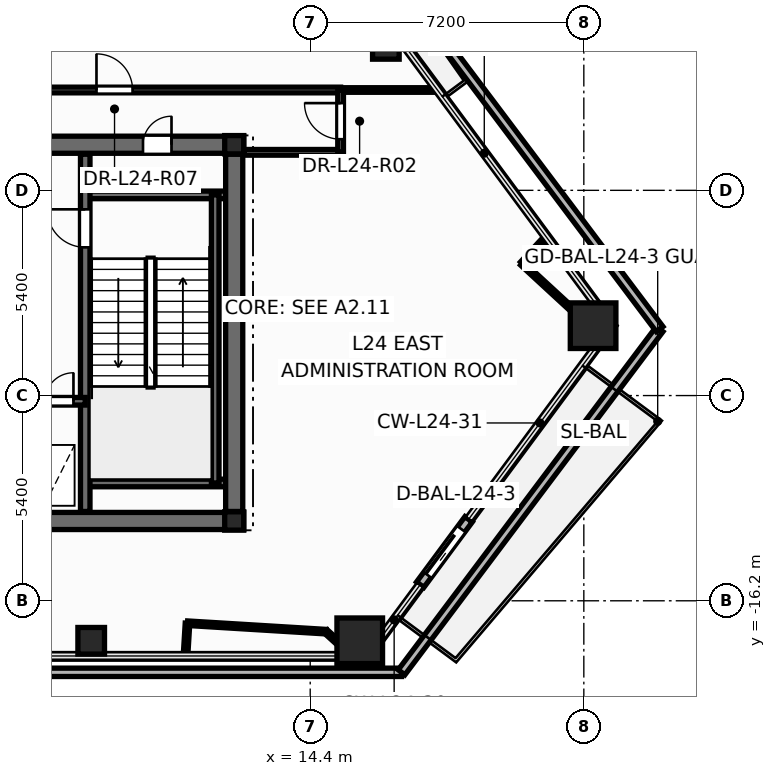
"""IFC4 building model, lengths in metres.
Left out: names, types, materials, properties, quantities, classifications, styles, units other than length and angle.
Written with IfcOpenShell. Run it as: python <this file> out.ifc"""

import sys

from ifc_helpers import new_model, si_unit, direction, frame, frame_2d, origin, origin_2d, place, context, subcontext, project, spatial, rectangle, hollow_rectangle, hollow_circle, i_section, extrude, element, fill, save


model = new_model("IFC4")
c1 = context("Model", 3, precision=1e-05, world=origin(), true_north=direction((0.0, 1.0)))
c2 = subcontext(c1, "Body", "Model", "MODEL_VIEW")
j1 = project(units=[si_unit("LENGTHUNIT", "METRE"), si_unit("PLANEANGLEUNIT", "RADIAN")], contexts=[c1])
p1 = place(None, origin())
s1 = spatial("IfcSite", under=j1, at=p1, CompositionType="ELEMENT")
p2 = place(p1, origin())
s2 = spatial("IfcBuilding", under=s1, at=p2, CompositionType="ELEMENT")
p3 = place(p2, frame((0.0, 0.0, 94.8)))
s3 = spatial("IfcBuildingStorey", under=s2, at=p3, CompositionType="ELEMENT", Elevation=94.8)
for number, where, z_axis, x_axis in (
    (1, (15.704, -17.252, 0.0), (0.0, 0.0, 1.0), (1.0, 0.0, 0.0)),
    (2, (21.844, -8.961, 0.0), (0.0, 0.0, 1.0), (1.0, 0.0, 0.0)),
):
    element("IfcColumn", number, at=place(p3, frame(where, z_axis=z_axis, x_axis=x_axis)), inside=s3, PredefinedType="COLUMN", context=c2, shape_type="SweptSolid", body=[
        extrude(hollow_rectangle(XDim=1.2, YDim=1.2, WallThickness=0.055, at=origin_2d()), origin(), (0.0, 0.0, 1.0), 4.8),
    ])
for number, where, z_axis, x_axis in (
    (3, (8.637, -17.252, 0.0), (0.0, 0.0, 1.0), (1.0, 0.0, 0.0)),
    (4, (16.391, -1.599, 0.0), (0.0, 0.0, 1.0), (1.0, 0.0, 0.0)),
):
    element("IfcColumn", number, at=place(p3, frame(where, z_axis=z_axis, x_axis=x_axis)), inside=s3, PredefinedType="COLUMN", context=c2, shape_type="SweptSolid", body=[
        extrude(hollow_circle(Radius=0.35, WallThickness=0.03, at=origin_2d()), origin(), (0.0, 0.0, 1.0), 4.8),
    ])
for number, where, z_axis, x_axis in (
    (5, (12.4, -14.1, 0.0), (0.0, 0.0, 1.0), (1.0, 0.0, 0.0)),
    (6, (12.4, -4.2, 0.0), (0.0, 0.0, 1.0), (1.0, 0.0, 0.0)),
):
    element("IfcColumn", number, at=place(p3, frame(where, z_axis=z_axis, x_axis=x_axis)), inside=s3, PredefinedType="COLUMN", context=c2, shape_type="SweptSolid", body=[
        extrude(i_section(OverallWidth=0.5, OverallDepth=0.482, WebThickness=0.04, FlangeThickness=0.045, at=origin_2d()), origin(), (0.0, 0.0, 1.0), 4.8),
    ])
p4 = place(p3, frame((-16.803, -18.082, -0.02), z_axis=(0.0, 0.0, 1.0), x_axis=(1.0, 0.0, 0.0)))
e7 = element("IfcWall", 7, at=p4, inside=s3, PredefinedType="PARAPET", context=c2, shape_type="SweptSolid", body=[
    extrude(rectangle(XDim=33.607, YDim=0.22, at=frame_2d((16.803, 0.0))), origin(), (0.0, 0.0, 1.0), 1.17),
])
p5 = place(p3, frame((16.803, -18.082, -0.02), z_axis=(0.0, 0.0, 1.0), x_axis=(0.601053883543, 0.79920850163, 0.0)))
e8 = element("IfcWall", 8, at=p5, inside=s3, PredefinedType="PARAPET", context=c2, shape_type="SweptSolid", body=[
    extrude(rectangle(XDim=11.299, YDim=0.22, at=frame_2d((5.65, 0.0))), origin(), (0.0, 0.0, 1.0), 1.17),
])
p6 = place(p3, frame((23.595, -9.052, -0.02), z_axis=(0.0, 0.0, 1.0), x_axis=(-0.601046808783, 0.799213822235, 0.0)))
e9 = element("IfcWall", 9, at=p6, inside=s3, PredefinedType="PARAPET", context=c2, shape_type="SweptSolid", body=[
    extrude(rectangle(XDim=27.898, YDim=0.22, at=frame_2d((13.949, 0.0))), origin(), (0.0, 0.0, 1.0), 1.17),
])
p7 = place(p3, frame((17.294, -15.776, -0.015), z_axis=(0.0, 0.0, 1.0), x_axis=(0.595170255066, 0.803599631337, 0.0)))
e10 = element("IfcWall", 10, at=p7, inside=s3, PredefinedType="STANDARD", context=c2, shape_type="SweptSolid", body=[
    extrude(rectangle(XDim=2.14, YDim=0.24, at=frame_2d((1.07, 0.0))), origin(), (0.0, 0.0, 1.0), 3.928),
])
p8 = place(p7, frame((0.32, 0.0, 0.015)))
e11 = element("IfcOpeningElement", 11, at=p8, cuts=e10, PredefinedType="OPENING", context=c2, shape_type="SweptSolid", body=[
    extrude(rectangle(XDim=1.506, YDim=2.204, at=frame_2d((0.75, 1.102))), frame((0.0, 0.13, 0.0), z_axis=(0.0, -1.0, 0.0), x_axis=(1.0, 0.0, 0.0)), (0.0, 0.0, 1.0), 0.26),
])
p9 = place(p3, frame((-12.65, -14.1, 0.0), z_axis=(0.0, 0.0, 1.0), x_axis=(1.0, 0.0, 0.0)))
e12 = element("IfcWall", 12, at=p9, inside=s3, PredefinedType="SHEAR", context=c2, shape_type="SweptSolid", body=[
    extrude(rectangle(XDim=25.3, YDim=0.45, at=frame_2d((12.65, 0.0))), origin(), (0.0, 0.0, 1.0), 4.8),
])
p10 = place(p3, frame((-12.65, -4.2, 0.0), z_axis=(0.0, 0.0, 1.0), x_axis=(1.0, 0.0, 0.0)))
e13 = element("IfcWall", 13, at=p10, inside=s3, PredefinedType="SHEAR", context=c2, shape_type="SweptSolid", body=[
    extrude(rectangle(XDim=25.3, YDim=0.45, at=frame_2d((12.65, 0.0))), origin(), (0.0, 0.0, 1.0), 4.8),
])
p11 = place(p10, frame((1.85, 0.0, 0.0)))
e14 = element("IfcOpeningElement", 14, at=p11, cuts=e13, PredefinedType="OPENING", context=c2, shape_type="SweptSolid", body=[
    extrude(rectangle(XDim=0.756, YDim=2.054, at=frame_2d((0.375, 1.027))), frame((0.0, 0.235, 0.0), z_axis=(0.0, -1.0, 0.0), x_axis=(1.0, 0.0, 0.0)), (0.0, 0.0, 1.0), 0.47),
])
p12 = place(p10, frame((22.65, 0.0, 0.0)))
e15 = element("IfcOpeningElement", 15, at=p12, cuts=e13, PredefinedType="OPENING", context=c2, shape_type="SweptSolid", body=[
    extrude(rectangle(XDim=0.756, YDim=2.054, at=frame_2d((0.375, 1.027))), frame((0.0, 0.235, 0.0), z_axis=(0.0, -1.0, 0.0), x_axis=(1.0, 0.0, 0.0)), (0.0, 0.0, 1.0), 0.47),
])
p13 = place(p10, frame((5.85, 0.0, 0.0)))
e16 = element("IfcOpeningElement", 16, at=p13, cuts=e13, PredefinedType="OPENING", context=c2, shape_type="SweptSolid", body=[
    extrude(rectangle(XDim=1.006, YDim=2.104, at=frame_2d((0.5, 1.052))), frame((0.0, 0.235, 0.0), z_axis=(0.0, -1.0, 0.0), x_axis=(1.0, 0.0, 0.0)), (0.0, 0.0, 1.0), 0.47),
])
p14 = place(p10, frame((10.35, 0.0, 0.0)))
e17 = element("IfcOpeningElement", 17, at=p14, cuts=e13, PredefinedType="OPENING", context=c2, shape_type="SweptSolid", body=[
    extrude(rectangle(XDim=1.406, YDim=2.154, at=frame_2d((0.7, 1.077))), frame((0.0, 0.235, 0.0), z_axis=(0.0, -1.0, 0.0), x_axis=(1.0, 0.0, 0.0)), (0.0, 0.0, 1.0), 0.47),
])
p15 = place(p10, frame((18.45, 0.0, 0.0)))
e18 = element("IfcOpeningElement", 18, at=p15, cuts=e13, PredefinedType="OPENING", context=c2, shape_type="SweptSolid", body=[
    extrude(rectangle(XDim=1.006, YDim=2.104, at=frame_2d((0.5, 1.052))), frame((0.0, 0.235, 0.0), z_axis=(0.0, -1.0, 0.0), x_axis=(1.0, 0.0, 0.0)), (0.0, 0.0, 1.0), 0.47),
])
for number, where, z_axis, x_axis in (
    (19, (8.48, -5.52, 0.0), (0.0, 0.0, 1.0), (1.0, 0.0, 0.0)),
    (20, (8.48, -13.1, 0.0), (0.0, 0.0, 1.0), (1.0, 0.0, 0.0)),
):
    element("IfcWall", number, at=place(p3, frame(where, z_axis=z_axis, x_axis=x_axis)), inside=s3, PredefinedType="SOLIDWALL", context=c2, shape_type="SweptSolid", body=[
        extrude(rectangle(XDim=3.87, YDim=0.2, at=frame_2d((1.935, 0.0))), origin(), (0.0, 0.0, 1.0), 4.8),
    ])
p16 = place(p3, frame((11.9, -13.1, 0.0), z_axis=(0.0, 0.0, 1.0), x_axis=(0.0, 1.0, 0.0)))
e21 = element("IfcWall", 21, at=p16, inside=s3, PredefinedType="SOLIDWALL", context=c2, shape_type="SweptSolid", body=[
    extrude(rectangle(XDim=7.58, YDim=0.2, at=frame_2d((3.79, 0.0))), origin(), (0.0, 0.0, 1.0), 4.8),
])
p17 = place(p3, frame((8.48, -13.85, 0.0), z_axis=(0.0, 0.0, 1.0), x_axis=(0.0, 1.0, 0.0)))
e22 = element("IfcWall", 22, at=p17, inside=s3, PredefinedType="SHEAR", context=c2, shape_type="SweptSolid", body=[
    extrude(rectangle(XDim=9.4, YDim=0.25, at=frame_2d((4.7, 0.0))), origin(), (0.0, 0.0, 1.0), 4.8),
])
p18 = place(p17, frame((6.95, 0.0, 0.0)))
e23 = element("IfcOpeningElement", 23, at=p18, cuts=e22, PredefinedType="OPENING", context=c2, shape_type="SweptSolid", body=[
    extrude(rectangle(XDim=1.006, YDim=2.104, at=frame_2d((0.5, 1.052))), frame((0.0, 0.135, 0.0), z_axis=(0.0, -1.0, 0.0), x_axis=(1.0, 0.0, 0.0)), (0.0, 0.0, 1.0), 0.27),
])
p19 = place(p3, frame((5.12, -10.95, 0.0), z_axis=(0.0, 0.0, 1.0), x_axis=(1.0, 0.0, 0.0)))
e24 = element("IfcWall", 24, at=p19, inside=s3, PredefinedType="SOLIDWALL", context=c2, shape_type="SweptSolid", body=[
    extrude(rectangle(XDim=3.36, YDim=0.2, at=frame_2d((1.68, 0.0))), origin(), (0.0, 0.0, 1.0), 4.8),
])
p20 = place(p19, frame((0.42, 0.0, 0.0)))
e25 = element("IfcOpeningElement", 25, at=p20, cuts=e24, PredefinedType="OPENING", context=c2, shape_type="SweptSolid", body=[
    extrude(rectangle(XDim=1.106, YDim=2.104, at=frame_2d((0.55, 1.052))), frame((0.0, 0.11, 0.0), z_axis=(0.0, -1.0, 0.0), x_axis=(1.0, 0.0, 0.0)), (0.0, 0.0, 1.0), 0.22),
])
p21 = place(p19, frame((2.3, 0.0, 0.0)))
e26 = element("IfcOpeningElement", 26, at=p21, cuts=e24, PredefinedType="OPENING", context=c2, shape_type="SweptSolid", body=[
    extrude(rectangle(XDim=0.756, YDim=2.054, at=frame_2d((0.375, 1.027))), frame((0.0, 0.11, 0.0), z_axis=(0.0, -1.0, 0.0), x_axis=(1.0, 0.0, 0.0)), (0.0, 0.0, 1.0), 0.22),
])
p22 = place(p3, frame((12.4, -13.85, 0.0), z_axis=(0.0, 0.0, 1.0), x_axis=(0.0, 1.0, 0.0)))
e27 = element("IfcWall", 27, at=p22, inside=s3, PredefinedType="SHEAR", context=c2, shape_type="SweptSolid", body=[
    extrude(rectangle(XDim=9.4, YDim=0.45, at=frame_2d((4.7, 0.0))), origin(), (0.0, 0.0, 1.0), 4.8),
])
p23 = place(p3, frame((5.14, -2.76, 0.0), z_axis=(0.0, 0.0, 1.0), x_axis=(1.0, 0.0, 0.0)))
e28 = element("IfcWall", 28, at=p23, inside=s3, PredefinedType="PARTITIONING", context=c2, shape_type="SweptSolid", body=[
    extrude(rectangle(XDim=10.06, YDim=0.15, at=frame_2d((5.03, 0.0))), origin(), (0.0, 0.0, 1.0), 3.525),
])
p24 = place(p23, frame((3.636, 0.0, 0.0)))
e29 = element("IfcOpeningElement", 29, at=p24, cuts=e28, PredefinedType="OPENING", context=c2, shape_type="SweptSolid", body=[
    extrude(rectangle(XDim=0.956, YDim=2.104, at=frame_2d((0.475, 1.052))), frame((0.0, 0.085, 0.0), z_axis=(0.0, -1.0, 0.0), x_axis=(1.0, 0.0, 0.0)), (0.0, 0.0, 1.0), 0.17),
])
p25 = place(p3, frame((11.171, -16.79, 0.0), z_axis=(0.0, 0.0, 1.0), x_axis=(0.998142834765, -0.060917004252, 0.0)))
e30 = element("IfcWall", 30, at=p25, inside=s3, PredefinedType="PARTITIONING", context=c2, shape_type="SweptSolid", body=[
    extrude(rectangle(XDim=3.651, YDim=0.12, at=frame_2d((1.826, 0.0))), origin(), (0.0, 0.0, 1.0), 4.55),
])
p26 = place(p3, frame((12.652, -4.4, 0.0), z_axis=(0.0, 0.0, 1.0), x_axis=(1.0, 0.0, 0.0)))
e31 = element("IfcWall", 31, at=p26, inside=s3, PredefinedType="PARTITIONING", context=c2, shape_type="SweptSolid", body=[
    extrude(rectangle(XDim=2.548, YDim=0.15, at=frame_2d((1.274, 0.0))), origin(), (0.0, 0.0, 1.0), 3.525),
])
p27 = place(p3, frame((15.2, -2.76, 0.0), z_axis=(0.0, 0.0, 1.0), x_axis=(1.0, 0.0, 0.0)))
e32 = element("IfcWall", 32, at=p27, inside=s3, PredefinedType="PARTITIONING", context=c2, shape_type="SweptSolid", body=[
    extrude(rectangle(XDim=2.549, YDim=0.12, at=frame_2d((1.274, 0.0))), origin(), (0.0, 0.0, 1.0), 3.913),
])
p28 = place(p3, frame((21.457, -8.689, 0.0), z_axis=(0.0, 0.0, 1.0), x_axis=(-0.735328734055, 0.677710596695, 0.0)))
e33 = element("IfcWall", 33, at=p28, inside=s3, PredefinedType="PARTITIONING", context=c2, shape_type="SweptSolid", body=[
    extrude(rectangle(XDim=2.013, YDim=0.12, at=frame_2d((1.006, 0.0))), origin(), (0.0, 0.0, 1.0), 3.525),
])
p29 = place(p3, frame((15.2, -4.4, 0.0), z_axis=(0.0, 0.0, 1.0), x_axis=(0.0, 1.0, 0.0)))
e34 = element("IfcWall", 34, at=p29, inside=s3, PredefinedType="PARTITIONING", context=c2, shape_type="SweptSolid", body=[
    extrude(rectangle(XDim=1.64, YDim=0.15, at=frame_2d((0.82, 0.0))), origin(), (0.0, 0.0, 1.0), 4.55),
])
p30 = place(p29, frame((0.345, 0.0, 0.0)))
e35 = element("IfcOpeningElement", 35, at=p30, cuts=e34, PredefinedType="OPENING", context=c2, shape_type="SweptSolid", body=[
    extrude(rectangle(XDim=0.956, YDim=2.104, at=frame_2d((0.475, 1.052))), frame((0.0, 0.085, 0.0), z_axis=(0.0, -1.0, 0.0), x_axis=(1.0, 0.0, 0.0)), (0.0, 0.0, 1.0), 0.17),
])
p31 = place(p3, frame((19.977, -7.325, 0.0), z_axis=(0.0, 0.0, 1.0), x_axis=(0.677725423192, 0.735315069041, 0.0)))
e36 = element("IfcWall", 36, at=p31, inside=s3, PredefinedType="PARTITIONING", context=c2, shape_type="SweptSolid", body=[
    extrude(rectangle(XDim=0.933, YDim=0.12, at=frame_2d((0.466, 0.0))), origin(), (0.0, 0.0, 1.0), 3.913),
])
p32 = place(p3, frame((11.119, -17.642, 0.0), z_axis=(0.0, 0.0, 1.0), x_axis=(0.060918168673, 0.998142763699, 0.0)))
e37 = element("IfcWall", 37, at=p32, inside=s3, PredefinedType="PARTITIONING", context=c2, shape_type="SweptSolid", body=[
    extrude(rectangle(XDim=0.854, YDim=0.12, at=frame_2d((0.427, 0.0))), origin(), (0.0, 0.0, 1.0), 3.913),
])
p33 = place(p3, frame((14.815, -17.012, 0.0), z_axis=(0.0, 0.0, 1.0), x_axis=(0.741182864327, -0.671303181601, 0.0)))
e38 = element("IfcWall", 38, at=p33, inside=s3, PredefinedType="PARTITIONING", context=c2, shape_type="SweptSolid", body=[
    extrude(rectangle(XDim=0.853, YDim=0.12, at=frame_2d((0.426, 0.0))), origin(), (0.0, 0.0, 1.0), 3.913),
])
p34 = place(p3, frame((22.213, -8.805, 0.0), z_axis=(0.0, 0.0, 1.0), x_axis=(-0.988441697341, 0.151601487322, 0.0)))
e39 = element("IfcWall", 39, at=p34, inside=s3, PredefinedType="PARTITIONING", context=c2, shape_type="SweptSolid", body=[
    extrude(rectangle(XDim=0.765, YDim=0.12, at=frame_2d((0.382, 0.0))), origin(), (0.0, 0.0, 1.0), 3.525),
])
p35 = place(p8, origin())
e40 = element("IfcDoor", 40, at=p35, inside=s3, OperationType="SLIDING_TO_RIGHT", PredefinedType="DOOR", context=c2, shape_type="SweptSolid", body=[
    extrude(rectangle(XDim=1.5, YDim=2.2, at=frame_2d((0.75, 1.1))), frame((0.0, 0.025, 0.0), z_axis=(0.0, -1.0, 0.0), x_axis=(1.0, 0.0, 0.0)), (0.0, 0.0, 1.0), 0.05),
])
fill(e11, e40)
p36 = place(p18, origin())
e41 = element("IfcDoor", 41, at=p36, inside=s3, OperationType="SINGLE_SWING_RIGHT", PredefinedType="DOOR", context=c2, shape_type="SweptSolid", body=[
    extrude(rectangle(XDim=1.0, YDim=2.1, at=frame_2d((0.5, 1.05))), frame((0.0, 0.025, 0.0), z_axis=(0.0, -1.0, 0.0), x_axis=(1.0, 0.0, 0.0)), (0.0, 0.0, 1.0), 0.05),
])
fill(e23, e41)
p37 = place(p21, origin())
e42 = element("IfcDoor", 42, at=p37, inside=s3, OperationType="SINGLE_SWING_RIGHT", PredefinedType="DOOR", context=c2, shape_type="SweptSolid", body=[
    extrude(rectangle(XDim=0.75, YDim=2.05, at=frame_2d((0.375, 1.025))), frame((0.0, 0.025, 0.0), z_axis=(0.0, -1.0, 0.0), x_axis=(1.0, 0.0, 0.0)), (0.0, 0.0, 1.0), 0.05),
])
fill(e26, e42)
p38 = place(p12, origin())
e43 = element("IfcDoor", 43, at=p38, inside=s3, OperationType="SINGLE_SWING_RIGHT", PredefinedType="DOOR", context=c2, shape_type="SweptSolid", body=[
    extrude(rectangle(XDim=0.75, YDim=2.05, at=frame_2d((0.375, 1.025))), frame((0.0, 0.025, 0.0), z_axis=(0.0, -1.0, 0.0), x_axis=(1.0, 0.0, 0.0)), (0.0, 0.0, 1.0), 0.05),
])
fill(e15, e43)
p39 = place(p30, origin())
e44 = element("IfcDoor", 44, at=p39, inside=s3, OperationType="SINGLE_SWING_RIGHT", PredefinedType="DOOR", context=c2, shape_type="SweptSolid", body=[
    extrude(rectangle(XDim=0.95, YDim=2.1, at=frame_2d((0.475, 1.05))), frame((0.0, 0.025, 0.0), z_axis=(0.0, -1.0, 0.0), x_axis=(1.0, 0.0, 0.0)), (0.0, 0.0, 1.0), 0.05),
])
fill(e35, e44)
p40 = place(p24, origin())
e45 = element("IfcDoor", 45, at=p40, inside=s3, OperationType="SINGLE_SWING_LEFT", PredefinedType="DOOR", context=c2, shape_type="SweptSolid", body=[
    extrude(rectangle(XDim=0.95, YDim=2.1, at=frame_2d((0.475, 1.05))), frame((0.0, 0.025, 0.0), z_axis=(0.0, -1.0, 0.0), x_axis=(1.0, 0.0, 0.0)), (0.0, 0.0, 1.0), 0.05),
])
fill(e29, e45)
save(model, sys.argv[1])
